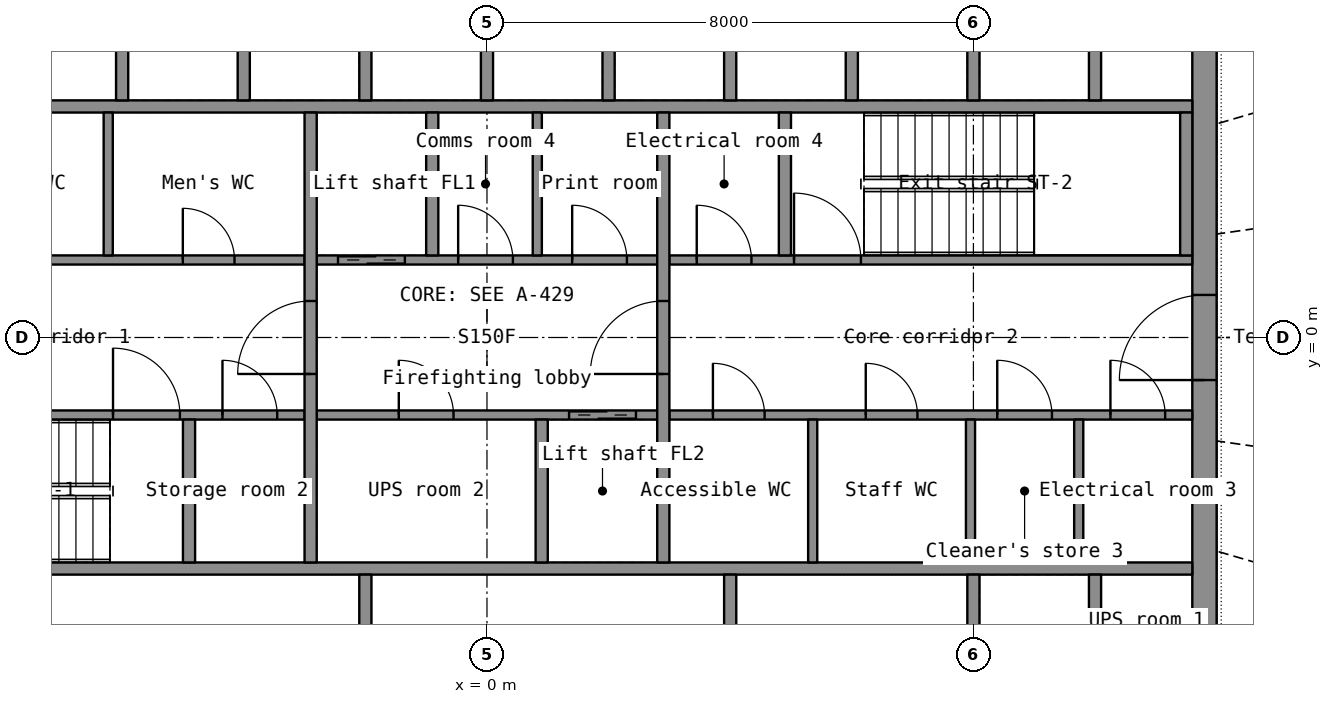
"""IFC4 building model, lengths in metres.
Left out: names, types, materials, properties, quantities, classifications, styles, units other than length and angle.
Written with IfcOpenShell. Run it as: python <this file> out.ifc"""

import sys

from ifc_helpers import new_model, si_unit, direction, frame, frame_2d, origin, place, context, subcontext, project, spatial, rectangle, extrude, element, fill, save


model = new_model("IFC4")
c1 = context("Model", 3, precision=1e-05, world=origin(), true_north=direction((0.0, 1.0)))
c2 = subcontext(c1, "Body", "Model", "MODEL_VIEW")
j1 = project(units=[si_unit("LENGTHUNIT", "METRE"), si_unit("PLANEANGLEUNIT", "RADIAN")], contexts=[c1])
p1 = place(None, origin())
s1 = spatial("IfcSite", under=j1, at=p1, CompositionType="ELEMENT")
p2 = place(p1, origin())
s2 = spatial("IfcBuilding", under=s1, at=p2, CompositionType="ELEMENT")
p3 = place(p2, frame((0.0, 0.0, 217.1)))
s3 = spatial("IfcBuildingStorey", under=s2, at=p3, CompositionType="ELEMENT", Elevation=217.1)
p4 = place(p3, frame((11.8, -7.2, 0.0), z_axis=(0.0, 0.0, 1.0), x_axis=(0.0, 1.0, 0.0)))
e1 = element("IfcWall", 1, at=p4, inside=s3, PredefinedType="SHEAR", context=c2, shape_type="SweptSolid", body=[
    extrude(rectangle(XDim=14.4, YDim=0.4, at=frame_2d((7.2, 0.0))), origin(), (0.0, 0.0, 1.0), 3.3),
])
p5 = place(p4, frame((6.5, 0.0, 0.0)))
e2 = element("IfcOpeningElement", 2, at=p5, cuts=e1, PredefinedType="OPENING", context=c2, shape_type="SweptSolid", body=[
    extrude(rectangle(XDim=1.4, YDim=2.2, at=frame_2d((0.7, 1.1))), frame((0.0, 0.21, 0.0), z_axis=(0.0, -1.0, 0.0), x_axis=(1.0, 0.0, 0.0)), (0.0, 0.0, 1.0), 0.42),
])
for number, where, z_axis, x_axis in (
    (3, (-11.6, -3.8, 0.0), (0.0, 0.0, 1.0), (1.0, 0.0, 0.0)),
    (4, (-11.6, 3.8, 0.0), (0.0, 0.0, 1.0), (1.0, 0.0, 0.0)),
):
    element("IfcWall", number, at=place(p3, frame(where, z_axis=z_axis, x_axis=x_axis)), inside=s3, PredefinedType="SHEAR", context=c2, shape_type="SweptSolid", body=[
        extrude(rectangle(XDim=23.2, YDim=0.2, at=frame_2d((11.6, 0.0))), origin(), (0.0, 0.0, 1.0), 3.3),
    ])
for number, where, z_axis, x_axis in (
    (5, (8.0, -6.8, 0.0), (0.0, 0.0, 1.0), (0.0, 1.0, 0.0)),
    (6, (10.0, -6.8, 0.0), (0.0, 0.0, 1.0), (0.0, 1.0, 0.0)),
):
    element("IfcWall", number, at=place(p3, frame(where, z_axis=z_axis, x_axis=x_axis)), inside=s3, PredefinedType="SHEAR", context=c2, shape_type="SweptSolid", body=[
        extrude(rectangle(XDim=2.9, YDim=0.2, at=frame_2d((1.45, 0.0))), origin(), (0.0, 0.0, 1.0), 3.3),
    ])
for number, where, z_axis, x_axis in (
    (7, (-2.0, -6.8, 0.0), (0.0, 0.0, 1.0), (0.0, 1.0, 0.0)),
    (8, (4.0, -6.8, 0.0), (0.0, 0.0, 1.0), (0.0, 1.0, 0.0)),
):
    element("IfcWall", number, at=place(p3, frame(where, z_axis=z_axis, x_axis=x_axis)), inside=s3, PredefinedType="PARTITIONING", context=c2, shape_type="SweptSolid", body=[
        extrude(rectangle(XDim=2.9, YDim=0.2, at=frame_2d((1.45, 0.0))), origin(), (0.0, 0.0, 1.0), 3.3),
    ])
for number, where, z_axis, x_axis in (
    (9, (-6.0, 3.9, 0.0), (0.0, 0.0, 1.0), (0.0, 1.0, 0.0)),
    (10, (-4.0, 3.9, 0.0), (0.0, 0.0, 1.0), (0.0, 1.0, 0.0)),
    (11, (-2.0, 3.9, 0.0), (0.0, 0.0, 1.0), (0.0, 1.0, 0.0)),
    (12, (0.0, 3.9, 0.0), (0.0, 0.0, 1.0), (0.0, 1.0, 0.0)),
    (13, (2.0, 3.9, 0.0), (0.0, 0.0, 1.0), (0.0, 1.0, 0.0)),
    (14, (4.0, 3.9, 0.0), (0.0, 0.0, 1.0), (0.0, 1.0, 0.0)),
    (15, (6.0, 3.9, 0.0), (0.0, 0.0, 1.0), (0.0, 1.0, 0.0)),
    (16, (8.0, 3.9, 0.0), (0.0, 0.0, 1.0), (0.0, 1.0, 0.0)),
    (17, (10.0, 3.9, 0.0), (0.0, 0.0, 1.0), (0.0, 1.0, 0.0)),
):
    element("IfcWall", number, at=place(p3, frame(where, z_axis=z_axis, x_axis=x_axis)), inside=s3, PredefinedType="SHEAR", context=c2, shape_type="SweptSolid", body=[
        extrude(rectangle(XDim=2.9, YDim=0.2, at=frame_2d((1.45, 0.0))), origin(), (0.0, 0.0, 1.0), 3.3),
    ])
p6 = place(p3, frame((-11.6, -1.275, 0.0), z_axis=(0.0, 0.0, 1.0), x_axis=(1.0, 0.0, 0.0)))
e18 = element("IfcWall", 18, at=p6, inside=s3, PredefinedType="SHEAR", context=c2, shape_type="SweptSolid", body=[
    extrude(rectangle(XDim=8.6, YDim=0.15, at=frame_2d((4.3, 0.0))), origin(), (0.0, 0.0, 1.0), 3.3),
])
p7 = place(p6, frame((5.45, 0.0, 0.0)))
e19 = element("IfcOpeningElement", 19, at=p7, cuts=e18, PredefinedType="OPENING", context=c2, shape_type="SweptSolid", body=[
    extrude(rectangle(XDim=1.1, YDim=2.15, at=frame_2d((0.55, 1.075))), frame((0.0, 0.085, 0.0), z_axis=(0.0, -1.0, 0.0), x_axis=(1.0, 0.0, 0.0)), (0.0, 0.0, 1.0), 0.17),
])
p8 = place(p6, frame((7.25, 0.0, 0.0)))
e20 = element("IfcOpeningElement", 20, at=p8, cuts=e18, PredefinedType="OPENING", context=c2, shape_type="SweptSolid", body=[
    extrude(rectangle(XDim=0.9, YDim=2.1, at=frame_2d((0.45, 1.05))), frame((0.0, 0.085, 0.0), z_axis=(0.0, -1.0, 0.0), x_axis=(1.0, 0.0, 0.0)), (0.0, 0.0, 1.0), 0.17),
])
p9 = place(p3, frame((-2.8, -1.275, 0.0), z_axis=(0.0, 0.0, 1.0), x_axis=(1.0, 0.0, 0.0)))
e21 = element("IfcWall", 21, at=p9, inside=s3, PredefinedType="SHEAR", context=c2, shape_type="SweptSolid", body=[
    extrude(rectangle(XDim=5.6, YDim=0.15, at=frame_2d((2.8, 0.0))), origin(), (0.0, 0.0, 1.0), 3.3),
])
p10 = place(p9, frame((4.15, 0.0, 0.0)))
e22 = element("IfcOpeningElement", 22, at=p10, cuts=e21, PredefinedType="OPENING", context=c2, shape_type="SweptSolid", body=[
    extrude(rectangle(XDim=1.1, YDim=2.2, at=frame_2d((0.55, 1.1))), frame((0.0, 0.085, 0.0), z_axis=(0.0, -1.0, 0.0), x_axis=(1.0, 0.0, 0.0)), (0.0, 0.0, 1.0), 0.17),
])
p11 = place(p9, frame((1.35, 0.0, 0.0)))
e23 = element("IfcOpeningElement", 23, at=p11, cuts=e21, PredefinedType="OPENING", context=c2, shape_type="SweptSolid", body=[
    extrude(rectangle(XDim=0.9, YDim=2.1, at=frame_2d((0.45, 1.05))), frame((0.0, 0.085, 0.0), z_axis=(0.0, -1.0, 0.0), x_axis=(1.0, 0.0, 0.0)), (0.0, 0.0, 1.0), 0.17),
])
p12 = place(p3, frame((3.0, -1.275, 0.0), z_axis=(0.0, 0.0, 1.0), x_axis=(1.0, 0.0, 0.0)))
e24 = element("IfcWall", 24, at=p12, inside=s3, PredefinedType="PARTITIONING", context=c2, shape_type="SweptSolid", body=[
    extrude(rectangle(XDim=8.6, YDim=0.15, at=frame_2d((4.3, 0.0))), origin(), (0.0, 0.0, 1.0), 3.3),
])
p13 = place(p12, frame((0.716, 0.0, 0.0)))
e25 = element("IfcOpeningElement", 25, at=p13, cuts=e24, PredefinedType="OPENING", context=c2, shape_type="SweptSolid", body=[
    extrude(rectangle(XDim=0.85, YDim=2.1, at=frame_2d((0.425, 1.05))), frame((0.0, 0.085, 0.0), z_axis=(0.0, -1.0, 0.0), x_axis=(1.0, 0.0, 0.0)), (0.0, 0.0, 1.0), 0.17),
])
p14 = place(p12, frame((3.229, 0.0, 0.0)))
e26 = element("IfcOpeningElement", 26, at=p14, cuts=e24, PredefinedType="OPENING", context=c2, shape_type="SweptSolid", body=[
    extrude(rectangle(XDim=0.85, YDim=2.1, at=frame_2d((0.425, 1.05))), frame((0.0, 0.085, 0.0), z_axis=(0.0, -1.0, 0.0), x_axis=(1.0, 0.0, 0.0)), (0.0, 0.0, 1.0), 0.17),
])
p15 = place(p12, frame((5.392, 0.0, 0.0)))
e27 = element("IfcOpeningElement", 27, at=p15, cuts=e24, PredefinedType="OPENING", context=c2, shape_type="SweptSolid", body=[
    extrude(rectangle(XDim=0.9, YDim=2.1, at=frame_2d((0.45, 1.05))), frame((0.0, 0.085, 0.0), z_axis=(0.0, -1.0, 0.0), x_axis=(1.0, 0.0, 0.0)), (0.0, 0.0, 1.0), 0.17),
])
p16 = place(p12, frame((7.253, 0.0, 0.0)))
e28 = element("IfcOpeningElement", 28, at=p16, cuts=e24, PredefinedType="OPENING", context=c2, shape_type="SweptSolid", body=[
    extrude(rectangle(XDim=0.9, YDim=2.1, at=frame_2d((0.45, 1.05))), frame((0.0, 0.085, 0.0), z_axis=(0.0, -1.0, 0.0), x_axis=(1.0, 0.0, 0.0)), (0.0, 0.0, 1.0), 0.17),
])
p17 = place(p3, frame((-11.6, 1.275, 0.0), z_axis=(0.0, 0.0, 1.0), x_axis=(1.0, 0.0, 0.0)))
e29 = element("IfcWall", 29, at=p17, inside=s3, PredefinedType="PARTITIONING", context=c2, shape_type="SweptSolid", body=[
    extrude(rectangle(XDim=8.6, YDim=0.15, at=frame_2d((4.3, 0.0))), origin(), (0.0, 0.0, 1.0), 3.3),
])
p18 = place(p17, frame((0.546, 0.0, 0.0)))
e30 = element("IfcOpeningElement", 30, at=p18, cuts=e29, PredefinedType="OPENING", context=c2, shape_type="SweptSolid", body=[
    extrude(rectangle(XDim=0.9, YDim=2.1, at=frame_2d((0.45, 1.05))), frame((0.0, 0.085, 0.0), z_axis=(0.0, -1.0, 0.0), x_axis=(1.0, 0.0, 0.0)), (0.0, 0.0, 1.0), 0.17),
])
p19 = place(p17, frame((3.294, 0.0, 0.0)))
e31 = element("IfcOpeningElement", 31, at=p19, cuts=e29, PredefinedType="OPENING", context=c2, shape_type="SweptSolid", body=[
    extrude(rectangle(XDim=0.85, YDim=2.1, at=frame_2d((0.425, 1.05))), frame((0.0, 0.085, 0.0), z_axis=(0.0, -1.0, 0.0), x_axis=(1.0, 0.0, 0.0)), (0.0, 0.0, 1.0), 0.17),
])
p20 = place(p17, frame((6.598, 0.0, 0.0)))
e32 = element("IfcOpeningElement", 32, at=p20, cuts=e29, PredefinedType="OPENING", context=c2, shape_type="SweptSolid", body=[
    extrude(rectangle(XDim=0.85, YDim=2.1, at=frame_2d((0.425, 1.05))), frame((0.0, 0.085, 0.0), z_axis=(0.0, -1.0, 0.0), x_axis=(1.0, 0.0, 0.0)), (0.0, 0.0, 1.0), 0.17),
])
p21 = place(p3, frame((-2.8, 1.275, 0.0), z_axis=(0.0, 0.0, 1.0), x_axis=(1.0, 0.0, 0.0)))
e33 = element("IfcWall", 33, at=p21, inside=s3, PredefinedType="SHEAR", context=c2, shape_type="SweptSolid", body=[
    extrude(rectangle(XDim=5.6, YDim=0.15, at=frame_2d((2.8, 0.0))), origin(), (0.0, 0.0, 1.0), 3.3),
])
p22 = place(p21, frame((0.35, 0.0, 0.0)))
e34 = element("IfcOpeningElement", 34, at=p22, cuts=e33, PredefinedType="OPENING", context=c2, shape_type="SweptSolid", body=[
    extrude(rectangle(XDim=1.1, YDim=2.2, at=frame_2d((0.55, 1.1))), frame((0.0, 0.085, 0.0), z_axis=(0.0, -1.0, 0.0), x_axis=(1.0, 0.0, 0.0)), (0.0, 0.0, 1.0), 0.17),
])
p23 = place(p21, frame((2.326, 0.0, 0.0)))
e35 = element("IfcOpeningElement", 35, at=p23, cuts=e33, PredefinedType="OPENING", context=c2, shape_type="SweptSolid", body=[
    extrude(rectangle(XDim=0.9, YDim=2.1, at=frame_2d((0.45, 1.05))), frame((0.0, 0.085, 0.0), z_axis=(0.0, -1.0, 0.0), x_axis=(1.0, 0.0, 0.0)), (0.0, 0.0, 1.0), 0.17),
])
p24 = place(p21, frame((4.201, 0.0, 0.0)))
e36 = element("IfcOpeningElement", 36, at=p24, cuts=e33, PredefinedType="OPENING", context=c2, shape_type="SweptSolid", body=[
    extrude(rectangle(XDim=0.9, YDim=2.1, at=frame_2d((0.45, 1.05))), frame((0.0, 0.085, 0.0), z_axis=(0.0, -1.0, 0.0), x_axis=(1.0, 0.0, 0.0)), (0.0, 0.0, 1.0), 0.17),
])
p25 = place(p3, frame((3.0, 1.275, 0.0), z_axis=(0.0, 0.0, 1.0), x_axis=(1.0, 0.0, 0.0)))
e37 = element("IfcWall", 37, at=p25, inside=s3, PredefinedType="SHEAR", context=c2, shape_type="SweptSolid", body=[
    extrude(rectangle(XDim=8.6, YDim=0.15, at=frame_2d((4.3, 0.0))), origin(), (0.0, 0.0, 1.0), 3.3),
])
p26 = place(p25, frame((2.05, 0.0, 0.0)))
e38 = element("IfcOpeningElement", 38, at=p26, cuts=e37, PredefinedType="OPENING", context=c2, shape_type="SweptSolid", body=[
    extrude(rectangle(XDim=1.1, YDim=2.15, at=frame_2d((0.55, 1.075))), frame((0.0, 0.085, 0.0), z_axis=(0.0, -1.0, 0.0), x_axis=(1.0, 0.0, 0.0)), (0.0, 0.0, 1.0), 0.17),
])
p27 = place(p25, frame((0.45, 0.0, 0.0)))
e39 = element("IfcOpeningElement", 39, at=p27, cuts=e37, PredefinedType="OPENING", context=c2, shape_type="SweptSolid", body=[
    extrude(rectangle(XDim=0.9, YDim=2.1, at=frame_2d((0.45, 1.05))), frame((0.0, 0.085, 0.0), z_axis=(0.0, -1.0, 0.0), x_axis=(1.0, 0.0, 0.0)), (0.0, 0.0, 1.0), 0.17),
])
p28 = place(p3, frame((-2.9, -3.7, 0.0), z_axis=(0.0, 0.0, 1.0), x_axis=(0.0, 1.0, 0.0)))
e40 = element("IfcWall", 40, at=p28, inside=s3, PredefinedType="SHEAR", context=c2, shape_type="SweptSolid", body=[
    extrude(rectangle(XDim=7.4, YDim=0.2, at=frame_2d((3.7, 0.0))), origin(), (0.0, 0.0, 1.0), 3.3),
])
p29 = place(p28, frame((3.1, 0.0, 0.0)))
e41 = element("IfcOpeningElement", 41, at=p29, cuts=e40, PredefinedType="OPENING", context=c2, shape_type="SweptSolid", body=[
    extrude(rectangle(XDim=1.2, YDim=2.2, at=frame_2d((0.6, 1.1))), frame((0.0, 0.11, 0.0), z_axis=(0.0, -1.0, 0.0), x_axis=(1.0, 0.0, 0.0)), (0.0, 0.0, 1.0), 0.22),
])
p30 = place(p3, frame((2.9, -3.7, 0.0), z_axis=(0.0, 0.0, 1.0), x_axis=(0.0, 1.0, 0.0)))
e42 = element("IfcWall", 42, at=p30, inside=s3, PredefinedType="SHEAR", context=c2, shape_type="SweptSolid", body=[
    extrude(rectangle(XDim=7.4, YDim=0.2, at=frame_2d((3.7, 0.0))), origin(), (0.0, 0.0, 1.0), 3.3),
])
p31 = place(p30, frame((3.1, 0.0, 0.0)))
e43 = element("IfcOpeningElement", 43, at=p31, cuts=e42, PredefinedType="OPENING", context=c2, shape_type="SweptSolid", body=[
    extrude(rectangle(XDim=1.2, YDim=2.2, at=frame_2d((0.6, 1.1))), frame((0.0, 0.11, 0.0), z_axis=(0.0, -1.0, 0.0), x_axis=(1.0, 0.0, 0.0)), (0.0, 0.0, 1.0), 0.22),
])
for number, where, z_axis, x_axis in (
    (44, (-0.9, 1.35, 0.0), (0.0, 0.0, 1.0), (0.0, 1.0, 0.0)),
    (45, (0.9, -3.7, 0.0), (0.0, 0.0, 1.0), (0.0, 1.0, 0.0)),
    (46, (11.5, 1.35, 0.0), (0.0, 0.0, 1.0), (0.0, 1.0, 0.0)),
    (47, (-4.9, -3.7, 0.0), (0.0, 0.0, 1.0), (0.0, 1.0, 0.0)),
    (48, (4.9, 1.35, 0.0), (0.0, 0.0, 1.0), (0.0, 1.0, 0.0)),
):
    element("IfcWall", number, at=place(p3, frame(where, z_axis=z_axis, x_axis=x_axis)), inside=s3, PredefinedType="SHEAR", context=c2, shape_type="SweptSolid", body=[
        extrude(rectangle(XDim=2.35, YDim=0.2, at=frame_2d((1.175, 0.0))), origin(), (0.0, 0.0, 1.0), 3.3),
    ])
for number, where, z_axis, x_axis in (
    (49, (-6.229, 1.35, 0.0), (0.0, 0.0, 1.0), (0.0, 1.0, 0.0)),
    (50, (5.357, -3.7, 0.0), (0.0, 0.0, 1.0), (0.0, 1.0, 0.0)),
    (51, (7.952, -3.7, 0.0), (0.0, 0.0, 1.0), (0.0, 1.0, 0.0)),
    (52, (9.732, -3.7, 0.0), (0.0, 0.0, 1.0), (0.0, 1.0, 0.0)),
    (53, (0.827, 1.35, 0.0), (0.0, 0.0, 1.0), (0.0, 1.0, 0.0)),
):
    element("IfcWall", number, at=place(p3, frame(where, z_axis=z_axis, x_axis=x_axis)), inside=s3, PredefinedType="PARTITIONING", context=c2, shape_type="SweptSolid", body=[
        extrude(rectangle(XDim=2.35, YDim=0.15, at=frame_2d((1.175, 0.0))), origin(), (0.0, 0.0, 1.0), 3.3),
    ])
p32 = place(p5, origin())
e54 = element("IfcDoor", 54, at=p32, inside=s3, OperationType="DOUBLE_DOOR_SINGLE_SWING", PredefinedType="DOOR", context=c2, shape_type="SweptSolid", body=[
    extrude(rectangle(XDim=1.4, YDim=2.2, at=frame_2d((0.7, 1.1))), frame((0.0, 0.025, 0.0), z_axis=(0.0, -1.0, 0.0), x_axis=(1.0, 0.0, 0.0)), (0.0, 0.0, 1.0), 0.05),
])
fill(e2, e54)
p33 = place(p29, origin())
e55 = element("IfcDoor", 55, at=p33, inside=s3, OperationType="SINGLE_SWING_LEFT", PredefinedType="DOOR", context=c2, shape_type="SweptSolid", body=[
    extrude(rectangle(XDim=1.2, YDim=2.2, at=frame_2d((0.6, 1.1))), frame((0.0, 0.025, 0.0), z_axis=(0.0, -1.0, 0.0), x_axis=(1.0, 0.0, 0.0)), (0.0, 0.0, 1.0), 0.05),
])
fill(e41, e55)
p34 = place(p31, origin())
e56 = element("IfcDoor", 56, at=p34, inside=s3, OperationType="SINGLE_SWING_LEFT", PredefinedType="DOOR", context=c2, shape_type="SweptSolid", body=[
    extrude(rectangle(XDim=1.2, YDim=2.2, at=frame_2d((0.6, 1.1))), frame((0.0, 0.025, 0.0), z_axis=(0.0, -1.0, 0.0), x_axis=(1.0, 0.0, 0.0)), (0.0, 0.0, 1.0), 0.05),
])
fill(e43, e56)
p35 = place(p22, origin())
e57 = element("IfcDoor", 57, at=p35, inside=s3, OperationType="DOUBLE_DOOR_SLIDING", PredefinedType="DOOR", context=c2, shape_type="SweptSolid", body=[
    extrude(rectangle(XDim=1.1, YDim=2.2, at=frame_2d((0.55, 1.1))), frame((0.0, 0.025, 0.0), z_axis=(0.0, -1.0, 0.0), x_axis=(1.0, 0.0, 0.0)), (0.0, 0.0, 1.0), 0.05),
])
fill(e34, e57)
p36 = place(p10, origin())
e58 = element("IfcDoor", 58, at=p36, inside=s3, OperationType="DOUBLE_DOOR_SLIDING", PredefinedType="DOOR", context=c2, shape_type="SweptSolid", body=[
    extrude(rectangle(XDim=1.1, YDim=2.2, at=frame_2d((0.55, 1.1))), frame((0.0, 0.025, 0.0), z_axis=(0.0, -1.0, 0.0), x_axis=(1.0, 0.0, 0.0)), (0.0, 0.0, 1.0), 0.05),
])
fill(e22, e58)
p37 = place(p7, origin())
e59 = element("IfcDoor", 59, at=p37, inside=s3, OperationType="SINGLE_SWING_LEFT", PredefinedType="DOOR", context=c2, shape_type="SweptSolid", body=[
    extrude(rectangle(XDim=1.1, YDim=2.15, at=frame_2d((0.55, 1.075))), frame((0.0, 0.025, 0.0), z_axis=(0.0, -1.0, 0.0), x_axis=(1.0, 0.0, 0.0)), (0.0, 0.0, 1.0), 0.05),
])
fill(e19, e59)
p38 = place(p26, origin())
e60 = element("IfcDoor", 60, at=p38, inside=s3, OperationType="SINGLE_SWING_LEFT", PredefinedType="DOOR", context=c2, shape_type="SweptSolid", body=[
    extrude(rectangle(XDim=1.1, YDim=2.15, at=frame_2d((0.55, 1.075))), frame((0.0, 0.025, 0.0), z_axis=(0.0, -1.0, 0.0), x_axis=(1.0, 0.0, 0.0)), (0.0, 0.0, 1.0), 0.05),
])
fill(e38, e60)
p39 = place(p20, origin())
e61 = element("IfcDoor", 61, at=p39, inside=s3, OperationType="SINGLE_SWING_LEFT", PredefinedType="DOOR", context=c2, shape_type="SweptSolid", body=[
    extrude(rectangle(XDim=0.85, YDim=2.1, at=frame_2d((0.425, 1.05))), frame((0.0, 0.025, 0.0), z_axis=(0.0, -1.0, 0.0), x_axis=(1.0, 0.0, 0.0)), (0.0, 0.0, 1.0), 0.05),
])
fill(e32, e61)
p40 = place(p13, origin())
e62 = element("IfcDoor", 62, at=p40, inside=s3, OperationType="SINGLE_SWING_LEFT", PredefinedType="DOOR", context=c2, shape_type="SweptSolid", body=[
    extrude(rectangle(XDim=0.85, YDim=2.1, at=frame_2d((0.425, 1.05))), frame((0.0, 0.025, 0.0), z_axis=(0.0, -1.0, 0.0), x_axis=(1.0, 0.0, 0.0)), (0.0, 0.0, 1.0), 0.05),
])
fill(e25, e62)
p41 = place(p14, origin())
e63 = element("IfcDoor", 63, at=p41, inside=s3, OperationType="SINGLE_SWING_LEFT", PredefinedType="DOOR", context=c2, shape_type="SweptSolid", body=[
    extrude(rectangle(XDim=0.85, YDim=2.1, at=frame_2d((0.425, 1.05))), frame((0.0, 0.025, 0.0), z_axis=(0.0, -1.0, 0.0), x_axis=(1.0, 0.0, 0.0)), (0.0, 0.0, 1.0), 0.05),
])
fill(e26, e63)
p42 = place(p15, origin())
e64 = element("IfcDoor", 64, at=p42, inside=s3, OperationType="SINGLE_SWING_LEFT", PredefinedType="DOOR", context=c2, shape_type="SweptSolid", body=[
    extrude(rectangle(XDim=0.9, YDim=2.1, at=frame_2d((0.45, 1.05))), frame((0.0, 0.025, 0.0), z_axis=(0.0, -1.0, 0.0), x_axis=(1.0, 0.0, 0.0)), (0.0, 0.0, 1.0), 0.05),
])
fill(e27, e64)
p43 = place(p16, origin())
e65 = element("IfcDoor", 65, at=p43, inside=s3, OperationType="SINGLE_SWING_LEFT", PredefinedType="DOOR", context=c2, shape_type="SweptSolid", body=[
    extrude(rectangle(XDim=0.9, YDim=2.1, at=frame_2d((0.45, 1.05))), frame((0.0, 0.025, 0.0), z_axis=(0.0, -1.0, 0.0), x_axis=(1.0, 0.0, 0.0)), (0.0, 0.0, 1.0), 0.05),
])
fill(e28, e65)
p44 = place(p23, origin())
e66 = element("IfcDoor", 66, at=p44, inside=s3, OperationType="SINGLE_SWING_LEFT", PredefinedType="DOOR", context=c2, shape_type="SweptSolid", body=[
    extrude(rectangle(XDim=0.9, YDim=2.1, at=frame_2d((0.45, 1.05))), frame((0.0, 0.025, 0.0), z_axis=(0.0, -1.0, 0.0), x_axis=(1.0, 0.0, 0.0)), (0.0, 0.0, 1.0), 0.05),
])
fill(e35, e66)
p45 = place(p24, origin())
e67 = element("IfcDoor", 67, at=p45, inside=s3, OperationType="SINGLE_SWING_LEFT", PredefinedType="DOOR", context=c2, shape_type="SweptSolid", body=[
    extrude(rectangle(XDim=0.9, YDim=2.1, at=frame_2d((0.45, 1.05))), frame((0.0, 0.025, 0.0), z_axis=(0.0, -1.0, 0.0), x_axis=(1.0, 0.0, 0.0)), (0.0, 0.0, 1.0), 0.05),
])
fill(e36, e67)
p46 = place(p11, origin())
e68 = element("IfcDoor", 68, at=p46, inside=s3, OperationType="SINGLE_SWING_LEFT", PredefinedType="DOOR", context=c2, shape_type="SweptSolid", body=[
    extrude(rectangle(XDim=0.9, YDim=2.1, at=frame_2d((0.45, 1.05))), frame((0.0, 0.025, 0.0), z_axis=(0.0, -1.0, 0.0), x_axis=(1.0, 0.0, 0.0)), (0.0, 0.0, 1.0), 0.05),
])
fill(e23, e68)
p47 = place(p27, origin())
e69 = element("IfcDoor", 69, at=p47, inside=s3, OperationType="SINGLE_SWING_LEFT", PredefinedType="DOOR", context=c2, shape_type="SweptSolid", body=[
    extrude(rectangle(XDim=0.9, YDim=2.1, at=frame_2d((0.45, 1.05))), frame((0.0, 0.025, 0.0), z_axis=(0.0, -1.0, 0.0), x_axis=(1.0, 0.0, 0.0)), (0.0, 0.0, 1.0), 0.05),
])
fill(e39, e69)
p48 = place(p8, origin())
e70 = element("IfcDoor", 70, at=p48, inside=s3, OperationType="SINGLE_SWING_LEFT", PredefinedType="DOOR", context=c2, shape_type="SweptSolid", body=[
    extrude(rectangle(XDim=0.9, YDim=2.1, at=frame_2d((0.45, 1.05))), frame((0.0, 0.025, 0.0), z_axis=(0.0, -1.0, 0.0), x_axis=(1.0, 0.0, 0.0)), (0.0, 0.0, 1.0), 0.05),
])
fill(e20, e70)
save(model, sys.argv[1])
